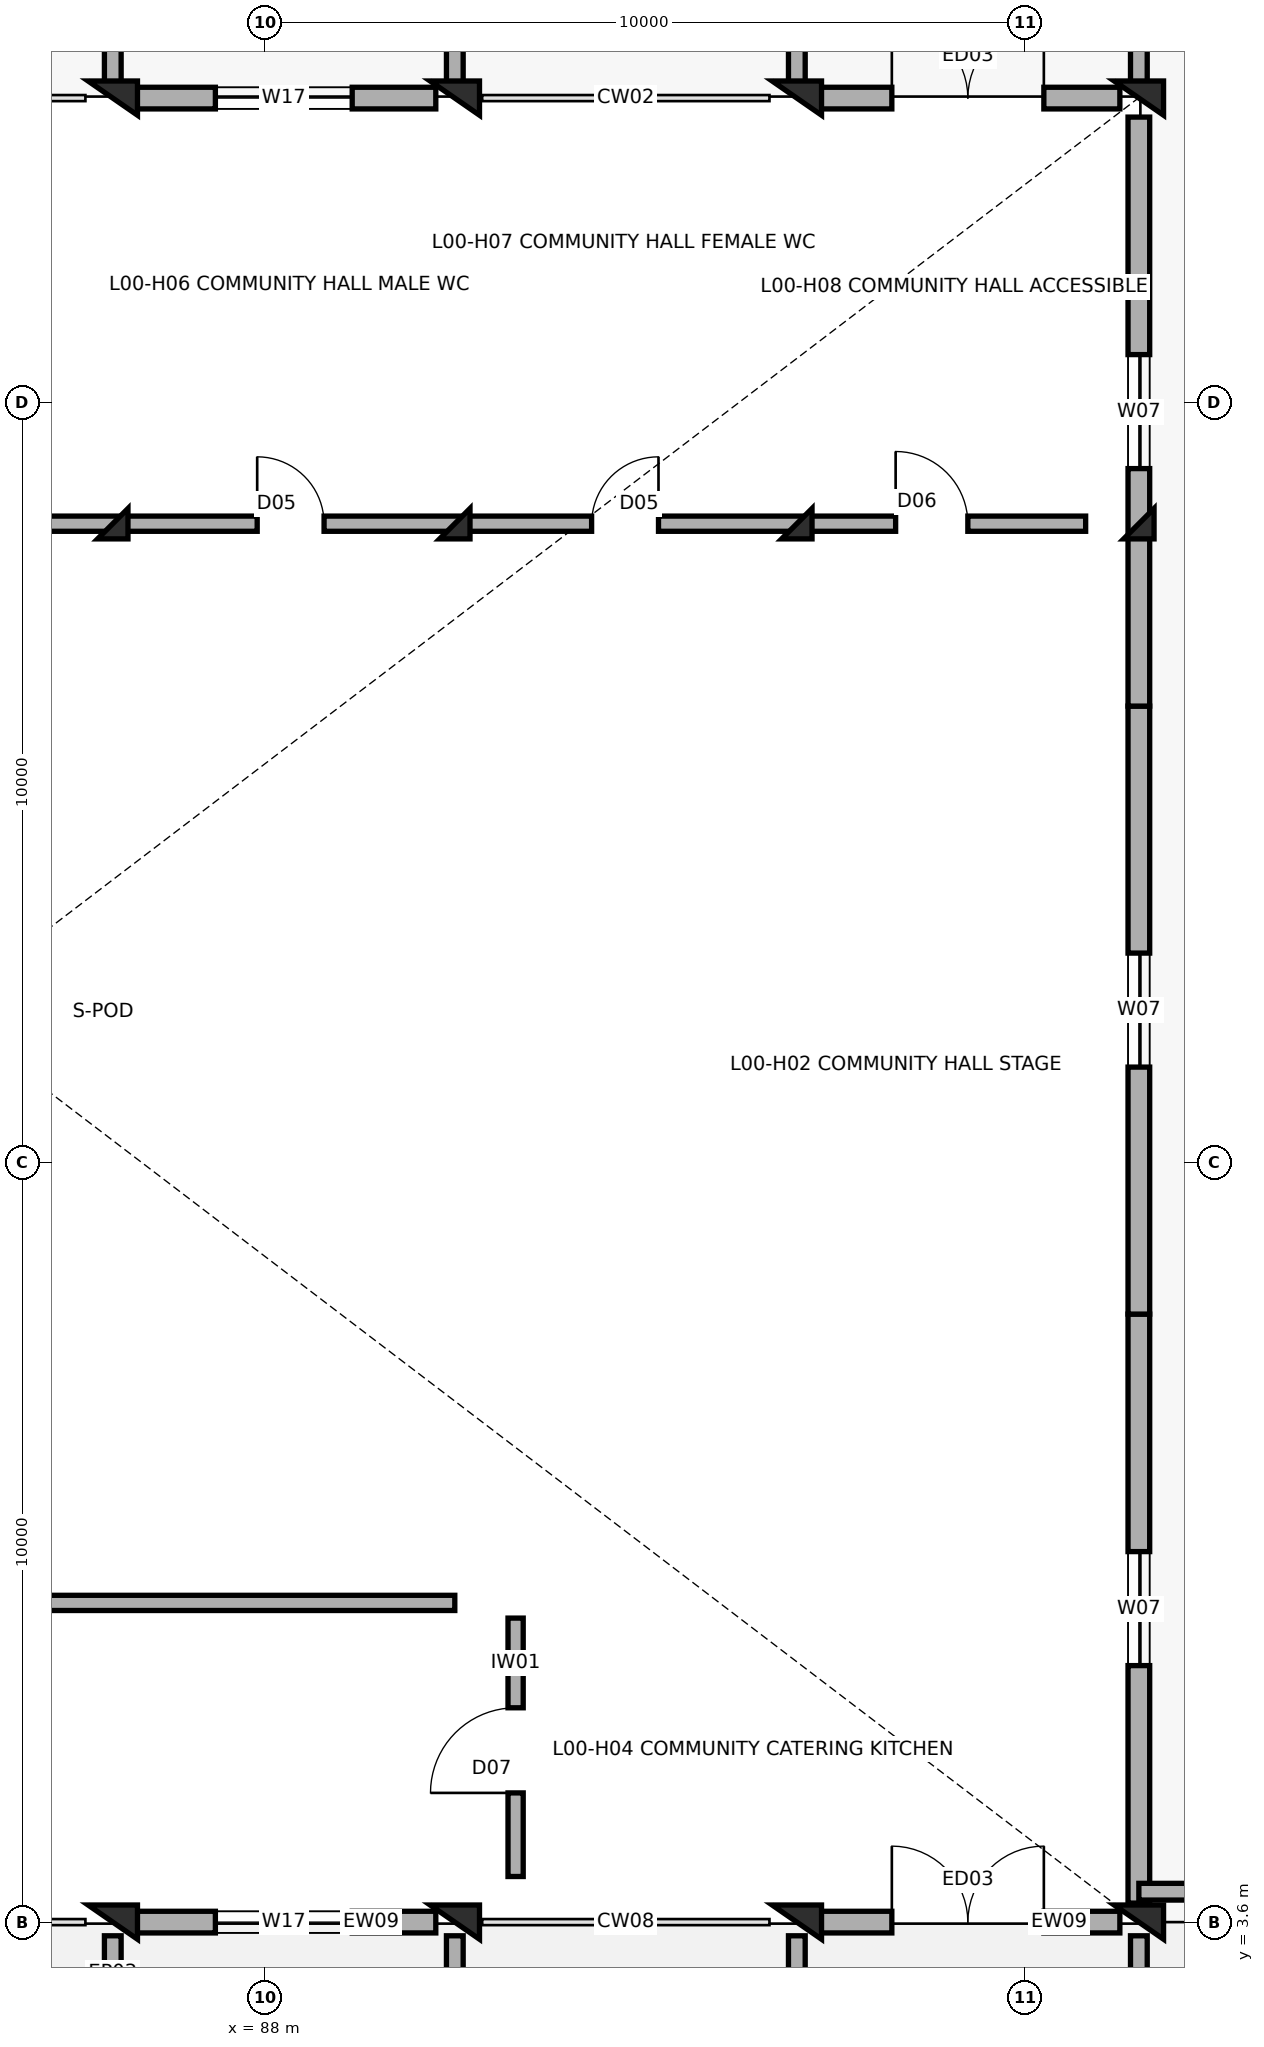
"""IFC4 building model, lengths in metres.
Left out: names, types, materials, properties, quantities, classifications, styles, units other than length and angle.
Written with IfcOpenShell. Run it as: python <this file> out.ifc"""

import sys

from ifc_helpers import new_model, si_unit, direction, frame, frame_2d, origin, origin_2d, place, context, subcontext, project, spatial, rectangle, extrude, element, fill, save


model = new_model("IFC4")
c1 = context("Model", 3, precision=1e-05, world=origin(), true_north=direction((0.0, 1.0)))
c2 = subcontext(c1, "Body", "Model", "MODEL_VIEW")
j1 = project(units=[si_unit("LENGTHUNIT", "METRE"), si_unit("PLANEANGLEUNIT", "RADIAN")], contexts=[c1])
p1 = place(None, origin())
s1 = spatial("IfcSite", under=j1, at=p1, CompositionType="ELEMENT")
p2 = place(p1, origin())
s2 = spatial("IfcBuilding", under=s1, at=p2, CompositionType="ELEMENT")
p3 = place(p2, origin())
s3 = spatial("IfcBuildingStorey", under=s2, at=p3, CompositionType="ELEMENT", Elevation=0.0)
for number, where, z_axis, x_axis in (
    (1, (86.0, 3.6, 0.0), (0.0, 0.0, 1.0), (0.0, 1.0, 0.0)),
    (2, (86.0, 27.6, 0.0), (0.0, 0.0, 1.0), (0.0, 1.0, 0.0)),
):
    element("IfcColumn", number, at=place(p3, frame(where, z_axis=z_axis, x_axis=x_axis)), inside=s3, PredefinedType="COLUMN", context=c2, shape_type="SweptSolid", body=[
        extrude(rectangle(XDim=0.45, YDim=0.65, at=origin_2d()), origin(), (0.0, 0.0, 1.0), 4.5),
    ])
p4 = place(p3, frame((86.0, 22.0, 0.0), z_axis=(0.0, 0.0, 1.0), x_axis=(1.0, 0.0, 0.0)))
e3 = element("IfcColumn", 3, at=p4, inside=s3, PredefinedType="COLUMN", context=c2, shape_type="SweptSolid", body=[
    extrude(rectangle(XDim=0.4, YDim=0.4, at=origin_2d()), origin(), (0.0, 0.0, 1.0), 4.5),
])
for number, where, z_axis, x_axis in (
    (4, (90.5, 3.6, 0.0), (0.0, 0.0, 1.0), (0.0, 1.0, 0.0)),
    (5, (90.5, 27.6, 0.0), (0.0, 0.0, 1.0), (0.0, 1.0, 0.0)),
):
    element("IfcColumn", number, at=place(p3, frame(where, z_axis=z_axis, x_axis=x_axis)), inside=s3, PredefinedType="COLUMN", context=c2, shape_type="SweptSolid", body=[
        extrude(rectangle(XDim=0.45, YDim=0.65, at=origin_2d()), origin(), (0.0, 0.0, 1.0), 4.5),
    ])
p5 = place(p3, frame((90.5, 22.0, 0.0), z_axis=(0.0, 0.0, 1.0), x_axis=(1.0, 0.0, 0.0)))
e6 = element("IfcColumn", 6, at=p5, inside=s3, PredefinedType="COLUMN", context=c2, shape_type="SweptSolid", body=[
    extrude(rectangle(XDim=0.4, YDim=0.4, at=origin_2d()), origin(), (0.0, 0.0, 1.0), 4.5),
])
for number, where, z_axis, x_axis in (
    (7, (95.0, 3.6, 0.0), (0.0, 0.0, 1.0), (0.0, 1.0, 0.0)),
    (8, (95.0, 27.6, 0.0), (0.0, 0.0, 1.0), (0.0, 1.0, 0.0)),
):
    element("IfcColumn", number, at=place(p3, frame(where, z_axis=z_axis, x_axis=x_axis)), inside=s3, PredefinedType="COLUMN", context=c2, shape_type="SweptSolid", body=[
        extrude(rectangle(XDim=0.45, YDim=0.65, at=origin_2d()), origin(), (0.0, 0.0, 1.0), 4.5),
    ])
p6 = place(p3, frame((95.0, 22.0, 0.0), z_axis=(0.0, 0.0, 1.0), x_axis=(1.0, 0.0, 0.0)))
e9 = element("IfcColumn", 9, at=p6, inside=s3, PredefinedType="COLUMN", context=c2, shape_type="SweptSolid", body=[
    extrude(rectangle(XDim=0.4, YDim=0.4, at=origin_2d()), origin(), (0.0, 0.0, 1.0), 4.5),
])
for number, where, z_axis, x_axis in (
    (10, (99.5, 3.6, 0.0), (0.0, 0.0, 1.0), (0.0, 1.0, 0.0)),
    (11, (99.5, 27.6, 0.0), (0.0, 0.0, 1.0), (0.0, 1.0, 0.0)),
):
    element("IfcColumn", number, at=place(p3, frame(where, z_axis=z_axis, x_axis=x_axis)), inside=s3, PredefinedType="COLUMN", context=c2, shape_type="SweptSolid", body=[
        extrude(rectangle(XDim=0.45, YDim=0.65, at=origin_2d()), origin(), (0.0, 0.0, 1.0), 4.5),
    ])
p7 = place(p3, frame((99.5, 22.0, 0.0), z_axis=(0.0, 0.0, 1.0), x_axis=(1.0, 0.0, 0.0)))
e12 = element("IfcColumn", 12, at=p7, inside=s3, PredefinedType="COLUMN", context=c2, shape_type="SweptSolid", body=[
    extrude(rectangle(XDim=0.4, YDim=0.4, at=origin_2d()), origin(), (0.0, 0.0, 1.0), 4.5),
])
p8 = place(p3, frame((86.25, 3.6, 0.0), z_axis=(0.0, 0.0, 1.0), x_axis=(1.0, 0.0, 0.0)))
e13 = element("IfcWall", 13, at=p8, inside=s3, PredefinedType="SOLIDWALL", context=c2, shape_type="SweptSolid", body=[
    extrude(rectangle(XDim=4.0, YDim=0.285, at=frame_2d((2.0, 0.0))), origin(), (0.0, 0.0, 1.0), 3.5),
])
p9 = place(p8, frame((1.1, 0.0, 0.45)))
e14 = element("IfcOpeningElement", 14, at=p9, cuts=e13, PredefinedType="OPENING", context=c2, shape_type="SweptSolid", body=[
    extrude(rectangle(XDim=1.8, YDim=2.1, at=frame_2d((0.9, 1.05))), frame((0.0, 0.152, 0.0), z_axis=(0.0, -1.0, 0.0), x_axis=(1.0, 0.0, 0.0)), (0.0, 0.0, 1.0), 0.305),
])
p10 = place(p3, frame((95.25, 3.6, 0.0), z_axis=(0.0, 0.0, 1.0), x_axis=(1.0, 0.0, 0.0)))
e15 = element("IfcWall", 15, at=p10, inside=s3, PredefinedType="SOLIDWALL", context=c2, shape_type="SweptSolid", body=[
    extrude(rectangle(XDim=4.0, YDim=0.285, at=frame_2d((2.0, 0.0))), origin(), (0.0, 0.0, 1.0), 3.5),
])
p11 = place(p10, frame((1.0, 0.0, 0.0)))
e16 = element("IfcOpeningElement", 16, at=p11, cuts=e15, PredefinedType="OPENING", context=c2, shape_type="SweptSolid", body=[
    extrude(rectangle(XDim=2.0, YDim=2.4, at=frame_2d((1.0, 1.2))), frame((0.0, 0.152, 0.0), z_axis=(0.0, -1.0, 0.0), x_axis=(1.0, 0.0, 0.0)), (0.0, 0.0, 1.0), 0.305),
])
p12 = place(p3, frame((86.25, 27.6, 0.0), z_axis=(0.0, 0.0, 1.0), x_axis=(1.0, 0.0, 0.0)))
e17 = element("IfcWall", 17, at=p12, inside=s3, PredefinedType="SOLIDWALL", context=c2, shape_type="SweptSolid", body=[
    extrude(rectangle(XDim=4.0, YDim=0.285, at=frame_2d((2.0, 0.0))), origin(), (0.0, 0.0, 1.0), 3.5),
])
p13 = place(p12, frame((1.1, 0.0, 0.45)))
e18 = element("IfcOpeningElement", 18, at=p13, cuts=e17, PredefinedType="OPENING", context=c2, shape_type="SweptSolid", body=[
    extrude(rectangle(XDim=1.8, YDim=2.1, at=frame_2d((0.9, 1.05))), frame((0.0, 0.152, 0.0), z_axis=(0.0, -1.0, 0.0), x_axis=(1.0, 0.0, 0.0)), (0.0, 0.0, 1.0), 0.305),
])
p14 = place(p3, frame((95.25, 27.6, 0.0), z_axis=(0.0, 0.0, 1.0), x_axis=(1.0, 0.0, 0.0)))
e19 = element("IfcWall", 19, at=p14, inside=s3, PredefinedType="SOLIDWALL", context=c2, shape_type="SweptSolid", body=[
    extrude(rectangle(XDim=4.0, YDim=0.285, at=frame_2d((2.0, 0.0))), origin(), (0.0, 0.0, 1.0), 3.5),
])
p15 = place(p14, frame((1.0, 0.0, 0.0)))
e20 = element("IfcOpeningElement", 20, at=p15, cuts=e19, PredefinedType="OPENING", context=c2, shape_type="SweptSolid", body=[
    extrude(rectangle(XDim=2.0, YDim=2.4, at=frame_2d((1.0, 1.2))), frame((0.0, 0.152, 0.0), z_axis=(0.0, -1.0, 0.0), x_axis=(1.0, 0.0, 0.0)), (0.0, 0.0, 1.0), 0.305),
])
p16 = place(p3, frame((99.5, 3.85, 0.0), z_axis=(0.0, 0.0, 1.0), x_axis=(0.0, 1.0, 0.0)))
e21 = element("IfcWall", 21, at=p16, inside=s3, PredefinedType="SOLIDWALL", context=c2, shape_type="SweptSolid", body=[
    extrude(rectangle(XDim=7.75, YDim=0.285, at=frame_2d((3.875, 0.0))), origin(), (0.0, 0.0, 1.0), 3.5),
])
p17 = place(p16, frame((3.125, 0.0, 0.45)))
e22 = element("IfcOpeningElement", 22, at=p17, cuts=e21, PredefinedType="OPENING", context=c2, shape_type="SweptSolid", body=[
    extrude(rectangle(XDim=1.5, YDim=1.65, at=frame_2d((0.75, 0.825))), frame((0.0, 0.152, 0.0), z_axis=(0.0, -1.0, 0.0), x_axis=(1.0, 0.0, 0.0)), (0.0, 0.0, 1.0), 0.305),
])
p18 = place(p3, frame((99.5, 11.6, 0.0), z_axis=(0.0, 0.0, 1.0), x_axis=(0.0, 1.0, 0.0)))
e23 = element("IfcWall", 23, at=p18, inside=s3, PredefinedType="SOLIDWALL", context=c2, shape_type="SweptSolid", body=[
    extrude(rectangle(XDim=8.0, YDim=0.285, at=frame_2d((4.0, 0.0))), origin(), (0.0, 0.0, 1.0), 3.5),
])
p19 = place(p18, frame((3.25, 0.0, 0.45)))
e24 = element("IfcOpeningElement", 24, at=p19, cuts=e23, PredefinedType="OPENING", context=c2, shape_type="SweptSolid", body=[
    extrude(rectangle(XDim=1.5, YDim=1.65, at=frame_2d((0.75, 0.825))), frame((0.0, 0.152, 0.0), z_axis=(0.0, -1.0, 0.0), x_axis=(1.0, 0.0, 0.0)), (0.0, 0.0, 1.0), 0.305),
])
p20 = place(p3, frame((99.5, 19.6, 0.0), z_axis=(0.0, 0.0, 1.0), x_axis=(0.0, 1.0, 0.0)))
e25 = element("IfcWall", 25, at=p20, inside=s3, PredefinedType="SOLIDWALL", context=c2, shape_type="SweptSolid", body=[
    extrude(rectangle(XDim=7.75, YDim=0.285, at=frame_2d((3.875, 0.0))), origin(), (0.0, 0.0, 1.0), 3.5),
])
p21 = place(p20, frame((3.125, 0.0, 0.45)))
e26 = element("IfcOpeningElement", 26, at=p21, cuts=e25, PredefinedType="OPENING", context=c2, shape_type="SweptSolid", body=[
    extrude(rectangle(XDim=1.5, YDim=1.65, at=frame_2d((0.75, 0.825))), frame((0.0, 0.152, 0.0), z_axis=(0.0, -1.0, 0.0), x_axis=(1.0, 0.0, 0.0)), (0.0, 0.0, 1.0), 0.305),
])
for number, where, z_axis, x_axis in (
    (27, (86.0, 2.55, 0.0), (0.0, 0.0, 1.0), (0.0, 1.0, 0.0)),
    (28, (86.0, 27.78, 0.0), (0.0, 0.0, 1.0), (0.0, 1.0, 0.0)),
    (29, (90.5, 2.55, 0.0), (0.0, 0.0, 1.0), (0.0, 1.0, 0.0)),
    (30, (90.5, 27.78, 0.0), (0.0, 0.0, 1.0), (0.0, 1.0, 0.0)),
    (31, (95.0, 2.55, 0.0), (0.0, 0.0, 1.0), (0.0, 1.0, 0.0)),
    (32, (95.0, 27.78, 0.0), (0.0, 0.0, 1.0), (0.0, 1.0, 0.0)),
    (33, (99.5, 2.55, 0.0), (0.0, 0.0, 1.0), (0.0, 1.0, 0.0)),
    (34, (99.5, 27.78, 0.0), (0.0, 0.0, 1.0), (0.0, 1.0, 0.0)),
):
    element("IfcWall", number, at=place(p3, frame(where, z_axis=z_axis, x_axis=x_axis)), inside=s3, PredefinedType="PARAPET", context=c2, shape_type="SweptSolid", body=[
        extrude(rectangle(XDim=0.87, YDim=0.22, at=frame_2d((0.435, 0.0))), origin(), (0.0, 0.0, 1.0), 4.5),
    ])
p22 = place(p3, frame((99.5, 4.0, 0.0), z_axis=(0.0, 0.0, 1.0), x_axis=(1.0, 0.0, 0.0)))
e35 = element("IfcWall", 35, at=p22, inside=s3, PredefinedType="SOLIDWALL", context=c2, shape_type="SweptSolid", body=[
    extrude(rectangle(XDim=12.5, YDim=0.22, at=frame_2d((6.25, 0.0))), origin(), (0.0, 0.0, 1.0), 3.1),
])
p23 = place(p22, frame((5.05, 0.0, 0.0)))
e36 = element("IfcOpeningElement", 36, at=p23, cuts=e35, PredefinedType="OPENING", context=c2, shape_type="SweptSolid", body=[
    extrude(rectangle(XDim=2.4, YDim=2.2, at=frame_2d((1.2, 1.1))), frame((0.0, 0.12, 0.0), z_axis=(0.0, -1.0, 0.0), x_axis=(1.0, 0.0, 0.0)), (0.0, 0.0, 1.0), 0.24),
])
p24 = place(p3, frame((69.0, 7.8, 0.0), z_axis=(0.0, 0.0, 1.0), x_axis=(1.0, 0.0, 0.0)))
e37 = element("IfcWall", 37, at=p24, inside=s3, PredefinedType="SOLIDWALL", context=c2, shape_type="SweptSolid", body=[
    extrude(rectangle(XDim=21.5, YDim=0.2, at=frame_2d((10.75, 0.0))), origin(), (0.0, 0.0, 1.0), 3.4),
])
p25 = place(p24, frame((4.5, 0.0, 0.0)))
e38 = element("IfcOpeningElement", 38, at=p25, cuts=e37, PredefinedType="OPENING", context=c2, shape_type="SweptSolid", body=[
    extrude(rectangle(XDim=1.6, YDim=2.25, at=frame_2d((0.8, 1.125))), frame((0.0, 0.11, 0.0), z_axis=(0.0, -1.0, 0.0), x_axis=(1.0, 0.0, 0.0)), (0.0, 0.0, 1.0), 0.22),
])
p26 = place(p24, frame((14.5, 0.0, 0.0)))
e39 = element("IfcOpeningElement", 39, at=p26, cuts=e37, PredefinedType="OPENING", context=c2, shape_type="SweptSolid", body=[
    extrude(rectangle(XDim=1.6, YDim=2.25, at=frame_2d((0.8, 1.125))), frame((0.0, 0.11, 0.0), z_axis=(0.0, -1.0, 0.0), x_axis=(1.0, 0.0, 0.0)), (0.0, 0.0, 1.0), 0.22),
])
p27 = place(p3, frame((91.3, 4.2, 0.0), z_axis=(0.0, 0.0, 1.0), x_axis=(0.0, 1.0, 0.0)))
e40 = element("IfcWall", 40, at=p27, inside=s3, PredefinedType="SOLIDWALL", context=c2, shape_type="SweptSolid", body=[
    extrude(rectangle(XDim=3.4, YDim=0.2, at=frame_2d((1.7, 0.0))), origin(), (0.0, 0.0, 1.0), 3.4),
])
p28 = place(p27, frame((1.1, 0.0, 0.0)))
e41 = element("IfcOpeningElement", 41, at=p28, cuts=e40, PredefinedType="OPENING", context=c2, shape_type="SweptSolid", body=[
    extrude(rectangle(XDim=1.12, YDim=2.15, at=frame_2d((0.56, 1.075))), frame((0.0, 0.11, 0.0), z_axis=(0.0, -1.0, 0.0), x_axis=(1.0, 0.0, 0.0)), (0.0, 0.0, 1.0), 0.22),
])
p29 = place(p3, frame((78.5, 22.0, 0.0), z_axis=(0.0, 0.0, 1.0), x_axis=(1.0, 0.0, 0.0)))
e42 = element("IfcWall", 42, at=p29, inside=s3, PredefinedType="SOLIDWALL", context=c2, shape_type="SweptSolid", body=[
    extrude(rectangle(XDim=20.3, YDim=0.2, at=frame_2d((10.15, 0.0))), origin(), (0.0, 0.0, 1.0), 3.4),
])
p30 = place(p29, frame((0.8, 0.0, 0.0)))
e43 = element("IfcOpeningElement", 43, at=p30, cuts=e42, PredefinedType="OPENING", context=c2, shape_type="SweptSolid", body=[
    extrude(rectangle(XDim=1.12, YDim=2.15, at=frame_2d((0.56, 1.075))), frame((0.0, 0.11, 0.0), z_axis=(0.0, -1.0, 0.0), x_axis=(1.0, 0.0, 0.0)), (0.0, 0.0, 1.0), 0.22),
])
p31 = place(p29, frame((9.4, 0.0, 0.0)))
e44 = element("IfcOpeningElement", 44, at=p31, cuts=e42, PredefinedType="OPENING", context=c2, shape_type="SweptSolid", body=[
    extrude(rectangle(XDim=0.88, YDim=2.1, at=frame_2d((0.44, 1.05))), frame((0.0, 0.11, 0.0), z_axis=(0.0, -1.0, 0.0), x_axis=(1.0, 0.0, 0.0)), (0.0, 0.0, 1.0), 0.22),
])
p32 = place(p29, frame((13.8, 0.0, 0.0)))
e45 = element("IfcOpeningElement", 45, at=p32, cuts=e42, PredefinedType="OPENING", context=c2, shape_type="SweptSolid", body=[
    extrude(rectangle(XDim=0.88, YDim=2.1, at=frame_2d((0.44, 1.05))), frame((0.0, 0.11, 0.0), z_axis=(0.0, -1.0, 0.0), x_axis=(1.0, 0.0, 0.0)), (0.0, 0.0, 1.0), 0.22),
])
p33 = place(p29, frame((17.8, 0.0, 0.0)))
e46 = element("IfcOpeningElement", 46, at=p33, cuts=e42, PredefinedType="OPENING", context=c2, shape_type="SweptSolid", body=[
    extrude(rectangle(XDim=0.95, YDim=2.1, at=frame_2d((0.475, 1.05))), frame((0.0, 0.11, 0.0), z_axis=(0.0, -1.0, 0.0), x_axis=(1.0, 0.0, 0.0)), (0.0, 0.0, 1.0), 0.22),
])
p34 = place(p9, origin())
e47 = element("IfcWindow", 47, at=p34, inside=s3, PartitioningType="DOUBLE_PANEL_HORIZONTAL", PredefinedType="WINDOW", context=c2, shape_type="SweptSolid", body=[
    extrude(rectangle(XDim=1.8, YDim=2.1, at=frame_2d((0.9, 1.05))), frame((0.0, 0.03, 0.0), z_axis=(0.0, -1.0, 0.0), x_axis=(1.0, 0.0, 0.0)), (0.0, 0.0, 1.0), 0.06),
])
fill(e14, e47)
p35 = place(p11, origin())
e48 = element("IfcDoor", 48, at=p35, inside=s3, OperationType="DOUBLE_DOOR_SINGLE_SWING", PredefinedType="DOOR", context=c2, shape_type="SweptSolid", body=[
    extrude(rectangle(XDim=2.0, YDim=2.4, at=frame_2d((1.0, 1.2))), frame((0.0, 0.025, 0.0), z_axis=(0.0, -1.0, 0.0), x_axis=(1.0, 0.0, 0.0)), (0.0, 0.0, 1.0), 0.05),
])
fill(e16, e48)
p36 = place(p13, origin())
e49 = element("IfcWindow", 49, at=p36, inside=s3, PartitioningType="DOUBLE_PANEL_HORIZONTAL", PredefinedType="WINDOW", context=c2, shape_type="SweptSolid", body=[
    extrude(rectangle(XDim=1.8, YDim=2.1, at=frame_2d((0.9, 1.05))), frame((0.0, 0.03, 0.0), z_axis=(0.0, -1.0, 0.0), x_axis=(1.0, 0.0, 0.0)), (0.0, 0.0, 1.0), 0.06),
])
fill(e18, e49)
p37 = place(p15, origin())
e50 = element("IfcDoor", 50, at=p37, inside=s3, OperationType="DOUBLE_DOOR_SINGLE_SWING", PredefinedType="DOOR", context=c2, shape_type="SweptSolid", body=[
    extrude(rectangle(XDim=2.0, YDim=2.4, at=frame_2d((1.0, 1.2))), frame((0.0, 0.025, 0.0), z_axis=(0.0, -1.0, 0.0), x_axis=(1.0, 0.0, 0.0)), (0.0, 0.0, 1.0), 0.05),
])
fill(e20, e50)
p38 = place(p17, origin())
e51 = element("IfcWindow", 51, at=p38, inside=s3, PartitioningType="DOUBLE_PANEL_VERTICAL", PredefinedType="WINDOW", context=c2, shape_type="SweptSolid", body=[
    extrude(rectangle(XDim=1.5, YDim=1.65, at=frame_2d((0.75, 0.825))), frame((0.0, 0.03, 0.0), z_axis=(0.0, -1.0, 0.0), x_axis=(1.0, 0.0, 0.0)), (0.0, 0.0, 1.0), 0.06),
])
fill(e22, e51)
p39 = place(p19, origin())
e52 = element("IfcWindow", 52, at=p39, inside=s3, PartitioningType="DOUBLE_PANEL_VERTICAL", PredefinedType="WINDOW", context=c2, shape_type="SweptSolid", body=[
    extrude(rectangle(XDim=1.5, YDim=1.65, at=frame_2d((0.75, 0.825))), frame((0.0, 0.03, 0.0), z_axis=(0.0, -1.0, 0.0), x_axis=(1.0, 0.0, 0.0)), (0.0, 0.0, 1.0), 0.06),
])
fill(e24, e52)
p40 = place(p21, origin())
e53 = element("IfcWindow", 53, at=p40, inside=s3, PartitioningType="DOUBLE_PANEL_VERTICAL", PredefinedType="WINDOW", context=c2, shape_type="SweptSolid", body=[
    extrude(rectangle(XDim=1.5, YDim=1.65, at=frame_2d((0.75, 0.825))), frame((0.0, 0.03, 0.0), z_axis=(0.0, -1.0, 0.0), x_axis=(1.0, 0.0, 0.0)), (0.0, 0.0, 1.0), 0.06),
])
fill(e26, e53)
p41 = place(p28, origin())
e54 = element("IfcDoor", 54, at=p41, inside=s3, OperationType="SINGLE_SWING_LEFT", PredefinedType="DOOR", context=c2, shape_type="SweptSolid", body=[
    extrude(rectangle(XDim=1.12, YDim=2.15, at=frame_2d((0.56, 1.075))), frame((0.0, 0.025, 0.0), z_axis=(0.0, -1.0, 0.0), x_axis=(1.0, 0.0, 0.0)), (0.0, 0.0, 1.0), 0.05),
])
fill(e41, e54)
p42 = place(p31, origin())
e55 = element("IfcDoor", 55, at=p42, inside=s3, OperationType="SINGLE_SWING_LEFT", PredefinedType="DOOR", context=c2, shape_type="SweptSolid", body=[
    extrude(rectangle(XDim=0.88, YDim=2.1, at=frame_2d((0.44, 1.05))), frame((0.0, 0.025, 0.0), z_axis=(0.0, -1.0, 0.0), x_axis=(1.0, 0.0, 0.0)), (0.0, 0.0, 1.0), 0.05),
])
fill(e44, e55)
p43 = place(p32, origin())
e56 = element("IfcDoor", 56, at=p43, inside=s3, OperationType="SINGLE_SWING_RIGHT", PredefinedType="DOOR", context=c2, shape_type="SweptSolid", body=[
    extrude(rectangle(XDim=0.88, YDim=2.1, at=frame_2d((0.44, 1.05))), frame((0.0, 0.025, 0.0), z_axis=(0.0, -1.0, 0.0), x_axis=(1.0, 0.0, 0.0)), (0.0, 0.0, 1.0), 0.05),
])
fill(e45, e56)
p44 = place(p33, origin())
e57 = element("IfcDoor", 57, at=p44, inside=s3, OperationType="SINGLE_SWING_LEFT", PredefinedType="DOOR", context=c2, shape_type="SweptSolid", body=[
    extrude(rectangle(XDim=0.95, YDim=2.1, at=frame_2d((0.475, 1.05))), frame((0.0, 0.025, 0.0), z_axis=(0.0, -1.0, 0.0), x_axis=(1.0, 0.0, 0.0)), (0.0, 0.0, 1.0), 0.05),
])
fill(e46, e57)
save(model, sys.argv[1])
